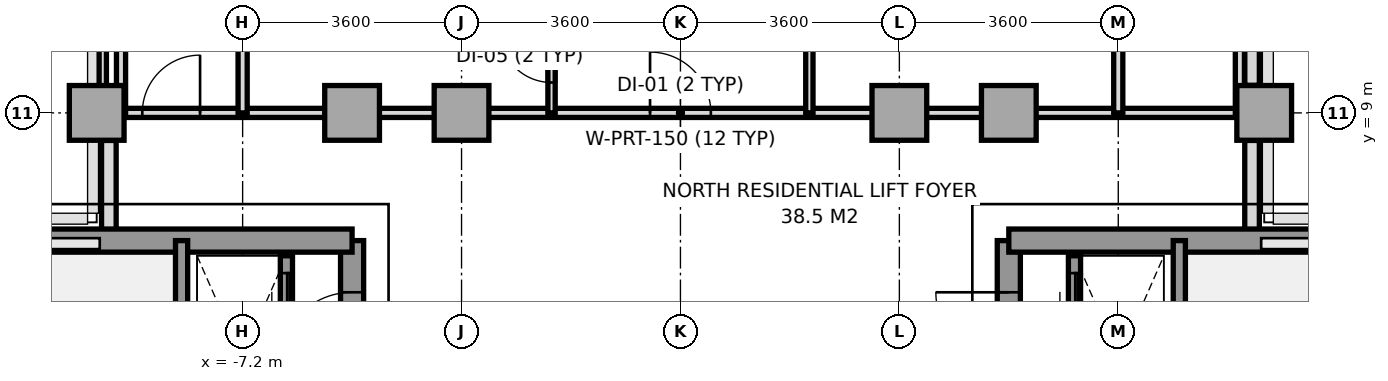
"""IFC4 building model, lengths in metres.
Left out: names, types, materials, properties, quantities, classifications, styles, units other than length and angle.
Written with IfcOpenShell. Run it as: python <this file> out.ifc"""

import sys

from ifc_helpers import new_model, si_unit, direction, frame, frame_2d, origin, origin_2d, place, context, subcontext, project, spatial, rectangle, extrude, source, transform, mapped, element, fill, save


model = new_model("IFC4")
c1 = context("Model", 3, precision=1e-05, world=origin(), true_north=direction((0.0, 1.0)))
c2 = subcontext(c1, "Body", "Model", "MODEL_VIEW")
j1 = project(units=[si_unit("LENGTHUNIT", "METRE"), si_unit("PLANEANGLEUNIT", "RADIAN")], contexts=[c1])
p1 = place(None, origin())
s1 = spatial("IfcSite", under=j1, at=p1, CompositionType="ELEMENT")
p2 = place(p1, origin())
s2 = spatial("IfcBuilding", under=s1, at=p2, CompositionType="ELEMENT")
p3 = place(p2, frame((0.0, 0.0, 208.0)))
s3 = spatial("IfcBuildingStorey", under=s2, at=p3, CompositionType="ELEMENT", Elevation=208.0)
m1 = source(origin(), c2, "Body", "SweptSolid", [
    extrude(rectangle(XDim=0.9, YDim=0.9, at=origin_2d()), origin(), (0.0, 0.0, 1.0), 3.2),
])
for number, where, z_axis, x_axis in (
    (1, (-9.6, 9.0, 0.0), (0.0, 0.0, 1.0), (1.0, 0.0, 0.0)),
    (2, (-5.4, 9.0, 0.0), (0.0, 0.0, 1.0), (1.0, 0.0, 0.0)),
    (3, (-3.6, 9.0, 0.0), (0.0, 0.0, 1.0), (1.0, 0.0, 0.0)),
    (4, (3.6, 9.0, 0.0), (0.0, 0.0, 1.0), (1.0, 0.0, 0.0)),
    (5, (5.4, 9.0, 0.0), (0.0, 0.0, 1.0), (1.0, 0.0, 0.0)),
    (6, (9.6, 9.0, 0.0), (0.0, 0.0, 1.0), (1.0, 0.0, 0.0)),
):
    element("IfcColumn", number, at=place(p3, frame(where, z_axis=z_axis, x_axis=x_axis)), inside=s3, PredefinedType="COLUMN", context=c2, shape_type="MappedRepresentation", body=[
        mapped(m1, transform((0.0, 0.0, 0.0), x_axis=(1.0, 0.0, 0.0), y_axis=(0.0, 1.0, 0.0), z_axis=(0.0, 0.0, 1.0), scale=1.0)),
    ])
p4 = place(p3, frame((-9.4, 6.953, 0.0), z_axis=(0.0, 0.0, 1.0), x_axis=(0.0, 1.0, 0.0)))
e7 = element("IfcWall", 7, at=p4, inside=s3, PredefinedType="PARAPET", context=c2, shape_type="SweptSolid", body=[
    extrude(rectangle(XDim=1.594, YDim=0.24, at=frame_2d((0.797, 0.0))), origin(), (0.0, 0.0, 1.0), 1.15),
])
p5 = place(p3, frame((9.4, 15.358, 0.0), z_axis=(0.0, 0.0, 1.0), x_axis=(0.0, -1.0, 0.0)))
e8 = element("IfcWall", 8, at=p5, inside=s3, PredefinedType="PARAPET", context=c2, shape_type="SweptSolid", body=[
    extrude(rectangle(XDim=5.905, YDim=0.24, at=frame_2d((2.952, 0.0))), origin(), (0.0, 0.0, 1.0), 1.15),
])
p6 = place(p3, frame((9.4, 8.547, 0.0), z_axis=(0.0, 0.0, 1.0), x_axis=(0.0, -1.0, 0.0)))
e9 = element("IfcWall", 9, at=p6, inside=s3, PredefinedType="PARAPET", context=c2, shape_type="SweptSolid", body=[
    extrude(rectangle(XDim=1.594, YDim=0.24, at=frame_2d((0.797, 0.0))), origin(), (0.0, 0.0, 1.0), 1.15),
])
p7 = place(p3, frame((-5.4, -5.6, 0.0), z_axis=(0.0, 0.0, 1.0), x_axis=(0.0, 1.0, 0.0)))
e10 = element("IfcWall", 10, at=p7, inside=s3, PredefinedType="SHEAR", context=c2, shape_type="SweptSolid", body=[
    extrude(rectangle(XDim=12.5, YDim=0.38, at=frame_2d((6.25, 0.0))), origin(), (0.0, 0.0, 1.0), 3.2),
])
p8 = place(p7, frame((4.55, 0.0, 0.0)))
e11 = element("IfcOpeningElement", 11, at=p8, cuts=e10, PredefinedType="OPENING", context=c2, shape_type="SweptSolid", body=[
    extrude(rectangle(XDim=1.2, YDim=2.2, at=frame_2d((0.6, 1.1))), frame((0.0, 0.2, 0.0), z_axis=(0.0, -1.0, 0.0), x_axis=(1.0, 0.0, 0.0)), (0.0, 0.0, 1.0), 0.4),
])
p9 = place(p7, frame((10.45, 0.0, 0.0)))
e12 = element("IfcOpeningElement", 12, at=p9, cuts=e10, PredefinedType="OPENING", context=c2, shape_type="SweptSolid", body=[
    extrude(rectangle(XDim=1.2, YDim=2.2, at=frame_2d((0.6, 1.1))), frame((0.0, 0.2, 0.0), z_axis=(0.0, -1.0, 0.0), x_axis=(1.0, 0.0, 0.0)), (0.0, 0.0, 1.0), 0.4),
])
p10 = place(p7, frame((6.86, 0.0, 0.0)))
e13 = element("IfcOpeningElement", 13, at=p10, cuts=e10, PredefinedType="OPENING", context=c2, shape_type="SweptSolid", body=[
    extrude(rectangle(XDim=0.8, YDim=2.1, at=frame_2d((0.4, 1.05))), frame((0.0, 0.2, 0.0), z_axis=(0.0, -1.0, 0.0), x_axis=(1.0, 0.0, 0.0)), (0.0, 0.0, 1.0), 0.4),
])
p11 = place(p3, frame((-11.356, 6.9, 0.0), z_axis=(0.0, 0.0, 1.0), x_axis=(1.0, 0.0, 0.0)))
e14 = element("IfcWall", 14, at=p11, inside=s3, PredefinedType="SHEAR", context=c2, shape_type="SweptSolid", body=[
    extrude(rectangle(XDim=5.956, YDim=0.38, at=frame_2d((2.978, 0.0))), origin(), (0.0, 0.0, 1.0), 3.2),
])
p12 = place(p3, frame((-8.204, -0.016, 0.0), z_axis=(0.0, 0.0, 1.0), x_axis=(0.0, 1.0, 0.0)))
e15 = element("IfcWall", 15, at=p12, inside=s3, PredefinedType="SOLIDWALL", context=c2, shape_type="SweptSolid", body=[
    extrude(rectangle(XDim=6.916, YDim=0.2, at=frame_2d((3.458, 0.0))), origin(), (0.0, 0.0, 1.0), 3.2),
])
p13 = place(p12, frame((0.2, 0.0, 0.0)))
e16 = element("IfcOpeningElement", 16, at=p13, cuts=e15, PredefinedType="OPENING", context=c2, shape_type="SweptSolid", body=[
    extrude(rectangle(XDim=1.2, YDim=2.2, at=frame_2d((0.6, 1.1))), frame((0.0, 0.11, 0.0), z_axis=(0.0, -1.0, 0.0), x_axis=(1.0, 0.0, 0.0)), (0.0, 0.0, 1.0), 0.22),
])
p14 = place(p3, frame((5.4, -5.6, 0.0), z_axis=(0.0, 0.0, 1.0), x_axis=(0.0, 1.0, 0.0)))
e17 = element("IfcWall", 17, at=p14, inside=s3, PredefinedType="SHEAR", context=c2, shape_type="SweptSolid", body=[
    extrude(rectangle(XDim=12.5, YDim=0.38, at=frame_2d((6.25, 0.0))), origin(), (0.0, 0.0, 1.0), 3.2),
])
p15 = place(p14, frame((4.55, 0.0, 0.0)))
e18 = element("IfcOpeningElement", 18, at=p15, cuts=e17, PredefinedType="OPENING", context=c2, shape_type="SweptSolid", body=[
    extrude(rectangle(XDim=1.2, YDim=2.2, at=frame_2d((0.6, 1.1))), frame((0.0, 0.2, 0.0), z_axis=(0.0, -1.0, 0.0), x_axis=(1.0, 0.0, 0.0)), (0.0, 0.0, 1.0), 0.4),
])
p16 = place(p14, frame((10.45, 0.0, 0.0)))
e19 = element("IfcOpeningElement", 19, at=p16, cuts=e17, PredefinedType="OPENING", context=c2, shape_type="SweptSolid", body=[
    extrude(rectangle(XDim=1.2, YDim=2.2, at=frame_2d((0.6, 1.1))), frame((0.0, 0.2, 0.0), z_axis=(0.0, -1.0, 0.0), x_axis=(1.0, 0.0, 0.0)), (0.0, 0.0, 1.0), 0.4),
])
p17 = place(p14, frame((6.86, 0.0, 0.0)))
e20 = element("IfcOpeningElement", 20, at=p17, cuts=e17, PredefinedType="OPENING", context=c2, shape_type="SweptSolid", body=[
    extrude(rectangle(XDim=0.8, YDim=2.1, at=frame_2d((0.4, 1.05))), frame((0.0, 0.2, 0.0), z_axis=(0.0, -1.0, 0.0), x_axis=(1.0, 0.0, 0.0)), (0.0, 0.0, 1.0), 0.4),
])
p18 = place(p3, frame((5.4, 6.9, 0.0), z_axis=(0.0, 0.0, 1.0), x_axis=(1.0, 0.0, 0.0)))
e21 = element("IfcWall", 21, at=p18, inside=s3, PredefinedType="SHEAR", context=c2, shape_type="SweptSolid", body=[
    extrude(rectangle(XDim=5.956, YDim=0.38, at=frame_2d((2.978, 0.0))), origin(), (0.0, 0.0, 1.0), 3.2),
])
p19 = place(p3, frame((8.204, -0.016, 0.0), z_axis=(0.0, 0.0, 1.0), x_axis=(0.0, 1.0, 0.0)))
e22 = element("IfcWall", 22, at=p19, inside=s3, PredefinedType="SOLIDWALL", context=c2, shape_type="SweptSolid", body=[
    extrude(rectangle(XDim=6.916, YDim=0.2, at=frame_2d((3.458, 0.0))), origin(), (0.0, 0.0, 1.0), 3.2),
])
p20 = place(p19, frame((0.2, 0.0, 0.0)))
e23 = element("IfcOpeningElement", 23, at=p20, cuts=e22, PredefinedType="OPENING", context=c2, shape_type="SweptSolid", body=[
    extrude(rectangle(XDim=1.2, YDim=2.2, at=frame_2d((0.6, 1.1))), frame((0.0, 0.11, 0.0), z_axis=(0.0, -1.0, 0.0), x_axis=(1.0, 0.0, 0.0)), (0.0, 0.0, 1.0), 0.22),
])
p21 = place(p3, frame((-6.48, 4.98, 0.0), z_axis=(0.0, 0.0, 1.0), x_axis=(0.0, 1.0, 0.0)))
e24 = element("IfcWall", 24, at=p21, inside=s3, PredefinedType="SOLIDWALL", context=c2, shape_type="SweptSolid", body=[
    extrude(rectangle(XDim=1.67, YDim=0.2, at=frame_2d((0.835, 0.0))), origin(), (0.0, 0.0, 1.0), 3.2),
])
p22 = place(p21, frame((0.285, 0.0, 0.0)))
e25 = element("IfcOpeningElement", 25, at=p22, cuts=e24, PredefinedType="OPENING", context=c2, shape_type="SweptSolid", body=[
    extrude(rectangle(XDim=1.1, YDim=2.2, at=frame_2d((0.55, 1.1))), frame((0.0, 0.11, 0.0), z_axis=(0.0, -1.0, 0.0), x_axis=(1.0, 0.0, 0.0)), (0.0, 0.0, 1.0), 0.22),
])
p23 = place(p3, frame((6.48, 4.98, 0.0), z_axis=(0.0, 0.0, 1.0), x_axis=(0.0, 1.0, 0.0)))
e26 = element("IfcWall", 26, at=p23, inside=s3, PredefinedType="SOLIDWALL", context=c2, shape_type="SweptSolid", body=[
    extrude(rectangle(XDim=1.67, YDim=0.2, at=frame_2d((0.835, 0.0))), origin(), (0.0, 0.0, 1.0), 3.2),
])
p24 = place(p23, frame((0.285, 0.0, 0.0)))
e27 = element("IfcOpeningElement", 27, at=p24, cuts=e26, PredefinedType="OPENING", context=c2, shape_type="SweptSolid", body=[
    extrude(rectangle(XDim=1.1, YDim=2.2, at=frame_2d((0.55, 1.1))), frame((0.0, 0.11, 0.0), z_axis=(0.0, -1.0, 0.0), x_axis=(1.0, 0.0, 0.0)), (0.0, 0.0, 1.0), 0.22),
])
p25 = place(p3, frame((-9.55, 9.0, 0.0), z_axis=(0.0, 0.0, 1.0), x_axis=(1.0, 0.0, 0.0)))
e28 = element("IfcWall", 28, at=p25, inside=s3, PredefinedType="PARTITIONING", context=c2, shape_type="SweptSolid", body=[
    extrude(rectangle(XDim=19.1, YDim=0.15, at=frame_2d((9.55, 0.0))), origin(), (0.0, 0.0, 1.0), 2.75),
])
p26 = place(p25, frame((0.7, 0.0, 0.0)))
e29 = element("IfcOpeningElement", 29, at=p26, cuts=e28, PredefinedType="OPENING", context=c2, shape_type="SweptSolid", body=[
    extrude(rectangle(XDim=0.95, YDim=2.15, at=frame_2d((0.475, 1.075))), frame((0.0, 0.085, 0.0), z_axis=(0.0, -1.0, 0.0), x_axis=(1.0, 0.0, 0.0)), (0.0, 0.0, 1.0), 0.17),
])
p27 = place(p25, frame((9.05, 0.0, 0.0)))
e30 = element("IfcOpeningElement", 30, at=p27, cuts=e28, PredefinedType="OPENING", context=c2, shape_type="SweptSolid", body=[
    extrude(rectangle(XDim=1.0, YDim=2.2, at=frame_2d((0.5, 1.1))), frame((0.0, 0.085, 0.0), z_axis=(0.0, -1.0, 0.0), x_axis=(1.0, 0.0, 0.0)), (0.0, 0.0, 1.0), 0.17),
])
for number, where, z_axis, x_axis in (
    (31, (-9.2, 9.0, 0.0), (0.0, 0.0, 1.0), (0.0, 1.0, 0.0)),
    (32, (9.2, 9.0, 0.0), (0.0, 0.0, 1.0), (0.0, 1.0, 0.0)),
):
    element("IfcWall", number, at=place(p3, frame(where, z_axis=z_axis, x_axis=x_axis)), inside=s3, PredefinedType="PARTITIONING", context=c2, shape_type="SweptSolid", body=[
        extrude(rectangle(XDim=6.68, YDim=0.15, at=frame_2d((3.34, 0.0))), origin(), (0.0, 0.0, 1.0), 2.75),
    ])
for number, where, z_axis, x_axis in (
    (33, (-7.2, 9.0, 0.0), (0.0, 0.0, 1.0), (0.0, 1.0, 0.0)),
    (34, (7.2, 9.0, 0.0), (0.0, 0.0, 1.0), (0.0, 1.0, 0.0)),
):
    element("IfcWall", number, at=place(p3, frame(where, z_axis=z_axis, x_axis=x_axis)), inside=s3, PredefinedType="PARTITIONING", context=c2, shape_type="SweptSolid", body=[
        extrude(rectangle(XDim=12.02, YDim=0.15, at=frame_2d((6.01, 0.0))), origin(), (0.0, 0.0, 1.0), 2.75),
    ])
p28 = place(p3, frame((-2.12, 9.0, 0.0), z_axis=(0.0, 0.0, 1.0), x_axis=(0.0, 1.0, 0.0)))
e35 = element("IfcWall", 35, at=p28, inside=s3, PredefinedType="PARTITIONING", context=c2, shape_type="SweptSolid", body=[
    extrude(rectangle(XDim=6.6, YDim=0.12, at=frame_2d((3.3, 0.0))), origin(), (0.0, 0.0, 1.0), 2.75),
])
p29 = place(p28, frame((0.5, 0.0, 0.0)))
e36 = element("IfcOpeningElement", 36, at=p29, cuts=e35, PredefinedType="OPENING", context=c2, shape_type="SweptSolid", body=[
    extrude(rectangle(XDim=0.85, YDim=2.1, at=frame_2d((0.425, 1.05))), frame((0.0, 0.07, 0.0), z_axis=(0.0, -1.0, 0.0), x_axis=(1.0, 0.0, 0.0)), (0.0, 0.0, 1.0), 0.14),
])
p30 = place(p28, frame((5.15, 0.0, 0.0)))
e37 = element("IfcOpeningElement", 37, at=p30, cuts=e35, PredefinedType="OPENING", context=c2, shape_type="SweptSolid", body=[
    extrude(rectangle(XDim=0.95, YDim=2.15, at=frame_2d((0.475, 1.075))), frame((0.0, 0.07, 0.0), z_axis=(0.0, -1.0, 0.0), x_axis=(1.0, 0.0, 0.0)), (0.0, 0.0, 1.0), 0.14),
])
p31 = place(p3, frame((2.12, 9.0, 0.0), z_axis=(0.0, 0.0, 1.0), x_axis=(0.0, 1.0, 0.0)))
e38 = element("IfcWall", 38, at=p31, inside=s3, PredefinedType="PARTITIONING", context=c2, shape_type="SweptSolid", body=[
    extrude(rectangle(XDim=6.6, YDim=0.12, at=frame_2d((3.3, 0.0))), origin(), (0.0, 0.0, 1.0), 2.75),
])
p32 = place(p31, frame((1.6, 0.0, 0.0)))
e39 = element("IfcOpeningElement", 39, at=p32, cuts=e38, PredefinedType="OPENING", context=c2, shape_type="SweptSolid", body=[
    extrude(rectangle(XDim=0.95, YDim=2.15, at=frame_2d((0.475, 1.075))), frame((0.0, 0.07, 0.0), z_axis=(0.0, -1.0, 0.0), x_axis=(1.0, 0.0, 0.0)), (0.0, 0.0, 1.0), 0.14),
])
p33 = place(p3, frame((-9.5, 9.0, 0.0), z_axis=(0.0, 0.0, 1.0), x_axis=(0.0, 1.0, 0.0)))
e40 = element("IfcWall", 40, at=p33, inside=s3, PredefinedType="PARTITIONING", context=c2, shape_type="SweptSolid", body=[
    extrude(rectangle(XDim=4.2, YDim=0.12, at=frame_2d((2.1, 0.0))), origin(), (0.0, 0.0, 1.0), 3.2),
])
m2 = source(origin(), c2, "Body", "SweptSolid", [
    extrude(rectangle(XDim=1.2, YDim=2.2, at=frame_2d((0.6, 1.1))), frame((0.0, 0.025, 0.0), z_axis=(0.0, -1.0, 0.0), x_axis=(1.0, 0.0, 0.0)), (0.0, 0.0, 1.0), 0.05),
])
p34 = place(p9, origin())
e41 = element("IfcDoor", 41, at=p34, inside=s3, OperationType="SINGLE_SWING_LEFT", PredefinedType="DOOR", context=c2, shape_type="MappedRepresentation", body=[
    mapped(m2, transform((0.0, 0.0, 0.0), x_axis=(1.0, 0.0, 0.0), y_axis=(0.0, 1.0, 0.0), z_axis=(0.0, 0.0, 1.0), scale=1.0)),
])
fill(e12, e41)
p35 = place(p16, origin())
e42 = element("IfcDoor", 42, at=p35, inside=s3, OperationType="SINGLE_SWING_RIGHT", PredefinedType="DOOR", context=c2, shape_type="MappedRepresentation", body=[
    mapped(m2, transform((0.0, 0.0, 0.0), x_axis=(1.0, 0.0, 0.0), y_axis=(0.0, 1.0, 0.0), z_axis=(0.0, 0.0, 1.0), scale=1.0)),
])
fill(e19, e42)
m3 = source(origin(), c2, "Body", "SweptSolid", [
    extrude(rectangle(XDim=1.1, YDim=2.2, at=frame_2d((0.55, 1.1))), frame((0.0, 0.025, 0.0), z_axis=(0.0, -1.0, 0.0), x_axis=(1.0, 0.0, 0.0)), (0.0, 0.0, 1.0), 0.05),
])
p36 = place(p22, origin())
e43 = element("IfcDoor", 43, at=p36, inside=s3, OperationType="SLIDING_TO_LEFT", PredefinedType="DOOR", context=c2, shape_type="MappedRepresentation", body=[
    mapped(m3, transform((0.0, 0.0, 0.0), x_axis=(1.0, 0.0, 0.0), y_axis=(0.0, 1.0, 0.0), z_axis=(0.0, 0.0, 1.0), scale=1.0)),
])
fill(e25, e43)
p37 = place(p24, origin())
e44 = element("IfcDoor", 44, at=p37, inside=s3, OperationType="SLIDING_TO_LEFT", PredefinedType="DOOR", context=c2, shape_type="MappedRepresentation", body=[
    mapped(m3, transform((0.0, 0.0, 0.0), x_axis=(1.0, 0.0, 0.0), y_axis=(0.0, 1.0, 0.0), z_axis=(0.0, 0.0, 1.0), scale=1.0)),
])
fill(e27, e44)
m4 = source(origin(), c2, "Body", "SweptSolid", [
    extrude(rectangle(XDim=0.95, YDim=2.15, at=frame_2d((0.475, 1.075))), frame((0.0, 0.025, 0.0), z_axis=(0.0, -1.0, 0.0), x_axis=(1.0, 0.0, 0.0)), (0.0, 0.0, 1.0), 0.05),
])
p38 = place(p26, origin())
e45 = element("IfcDoor", 45, at=p38, inside=s3, OperationType="SINGLE_SWING_RIGHT", PredefinedType="DOOR", context=c2, shape_type="MappedRepresentation", body=[
    mapped(m4, transform((0.0, 0.0, 0.0), x_axis=(1.0, 0.0, 0.0), y_axis=(0.0, 1.0, 0.0), z_axis=(0.0, 0.0, 1.0), scale=1.0)),
])
fill(e29, e45)
m5 = source(origin(), c2, "Body", "SweptSolid", [
    extrude(rectangle(XDim=1.0, YDim=2.2, at=frame_2d((0.5, 1.1))), frame((0.0, 0.025, 0.0), z_axis=(0.0, -1.0, 0.0), x_axis=(1.0, 0.0, 0.0)), (0.0, 0.0, 1.0), 0.05),
])
p39 = place(p27, origin())
e46 = element("IfcDoor", 46, at=p39, inside=s3, OperationType="SINGLE_SWING_LEFT", PredefinedType="DOOR", context=c2, shape_type="MappedRepresentation", body=[
    mapped(m5, transform((0.0, 0.0, 0.0), x_axis=(1.0, 0.0, 0.0), y_axis=(0.0, 1.0, 0.0), z_axis=(0.0, 0.0, 1.0), scale=1.0)),
])
fill(e30, e46)
m6 = source(origin(), c2, "Body", "SweptSolid", [
    extrude(rectangle(XDim=0.85, YDim=2.1, at=frame_2d((0.425, 1.05))), frame((0.0, 0.025, 0.0), z_axis=(0.0, -1.0, 0.0), x_axis=(1.0, 0.0, 0.0)), (0.0, 0.0, 1.0), 0.05),
])
p40 = place(p29, origin())
e47 = element("IfcDoor", 47, at=p40, inside=s3, OperationType="SINGLE_SWING_RIGHT", PredefinedType="DOOR", context=c2, shape_type="MappedRepresentation", body=[
    mapped(m6, transform((0.0, 0.0, 0.0), x_axis=(1.0, 0.0, 0.0), y_axis=(0.0, 1.0, 0.0), z_axis=(0.0, 0.0, 1.0), scale=1.0)),
])
fill(e36, e47)
save(model, sys.argv[1])
